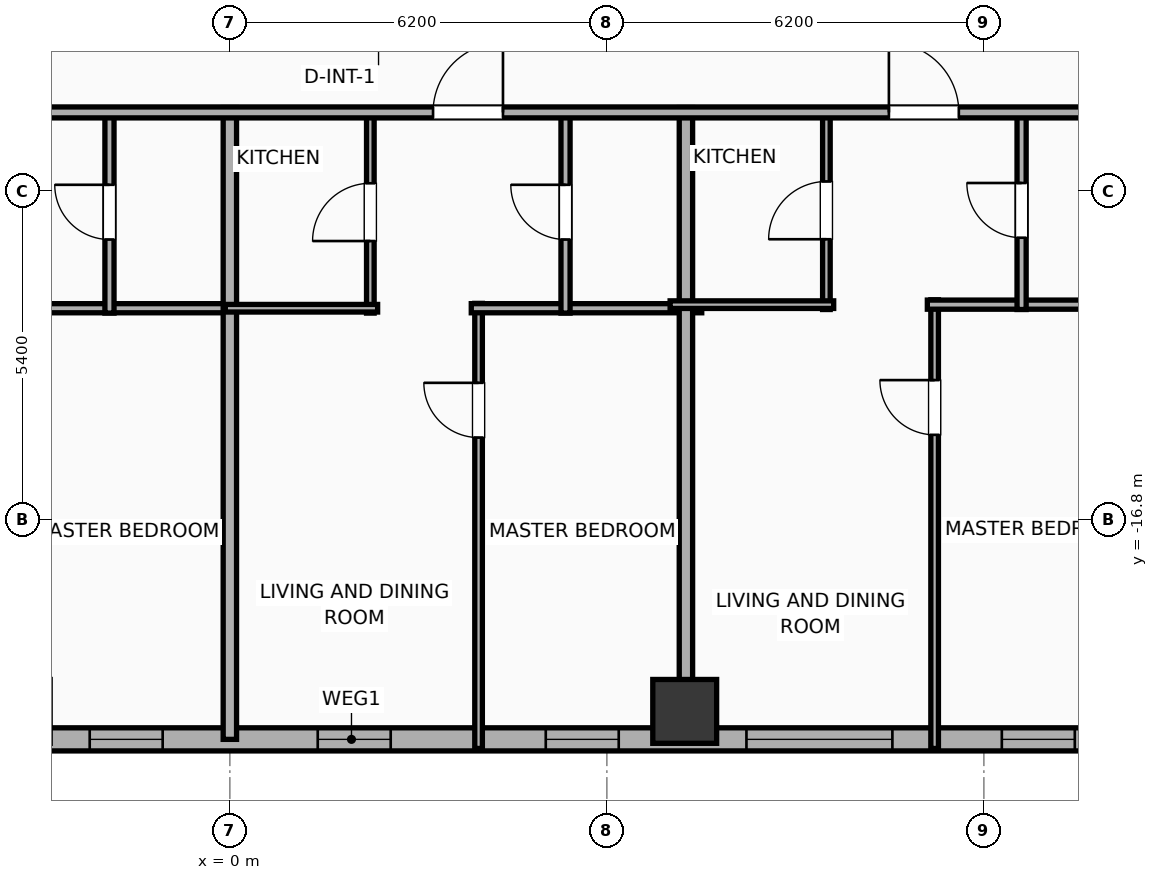
"""IFC4 building model, lengths in metres.
Left out: names, types, materials, properties, quantities, classifications, styles, units other than length and angle.
Written with IfcOpenShell. Run it as: python <this file> out.ifc"""

import sys

from ifc_helpers import new_model, si_unit, direction, frame, frame_2d, origin, origin_2d, place, context, subcontext, project, spatial, rectangle, hollow_rectangle, extrude, element, fill, save


model = new_model("IFC4")
c1 = context("Model", 3, precision=1e-05, world=origin(), true_north=direction((0.0, 1.0)))
c2 = subcontext(c1, "Body", "Model", "MODEL_VIEW")
j1 = project(units=[si_unit("LENGTHUNIT", "METRE"), si_unit("PLANEANGLEUNIT", "RADIAN")], contexts=[c1])
p1 = place(None, origin())
s1 = spatial("IfcSite", under=j1, at=p1, CompositionType="ELEMENT")
p2 = place(p1, origin())
s2 = spatial("IfcBuilding", under=s1, at=p2, CompositionType="ELEMENT")
p3 = place(p2, frame((0.0, 0.0, 136.5)))
s3 = spatial("IfcBuildingStorey", under=s2, at=p3, CompositionType="ELEMENT", Elevation=136.5)
p4 = place(p3, frame((7.48, -19.95, 0.0), z_axis=(0.0, 0.0, 1.0), x_axis=(1.0, 0.0, 0.0)))
e1 = element("IfcColumn", 1, at=p4, inside=s3, PredefinedType="COLUMN", context=c2, shape_type="SweptSolid", body=[
    extrude(hollow_rectangle(XDim=1.05, YDim=1.05, WallThickness=0.036, at=origin_2d()), origin(), (0.0, 0.0, 1.0), 3.865),
])
p5 = place(p3, frame((29.381, -20.41, 0.0), z_axis=(0.0, 0.0, 1.0), x_axis=(-1.0, 0.0, 0.0)))
e2 = element("IfcWall", 2, at=p5, inside=s3, PredefinedType="ELEMENTEDWALL", context=c2, shape_type="SweptSolid", body=[
    extrude(rectangle(XDim=54.763, YDim=0.38, at=frame_2d((27.381, 0.0))), origin(), (0.0, 0.0, 1.0), 2.39),
])
p6 = place(p5, frame((7.295, 0.0, 0.75)))
e3 = element("IfcOpeningElement", 3, at=p6, cuts=e2, PredefinedType="OPENING", context=c2, shape_type="SweptSolid", body=[
    extrude(rectangle(XDim=2.4, YDim=1.45, at=frame_2d((1.2, 0.725))), frame((0.0, 0.2, 0.0), z_axis=(0.0, -1.0, 0.0), x_axis=(1.0, 0.0, 0.0)), (0.0, 0.0, 1.0), 0.4),
])
p7 = place(p5, frame((18.486, 0.0, 0.75)))
e4 = element("IfcOpeningElement", 4, at=p7, cuts=e2, PredefinedType="OPENING", context=c2, shape_type="SweptSolid", body=[
    extrude(rectangle(XDim=2.4, YDim=1.45, at=frame_2d((1.2, 0.725))), frame((0.0, 0.2, 0.0), z_axis=(0.0, -1.0, 0.0), x_axis=(1.0, 0.0, 0.0)), (0.0, 0.0, 1.0), 0.4),
])
p8 = place(p5, frame((33.877, 0.0, 0.75)))
e5 = element("IfcOpeningElement", 5, at=p8, cuts=e2, PredefinedType="OPENING", context=c2, shape_type="SweptSolid", body=[
    extrude(rectangle(XDim=2.4, YDim=1.45, at=frame_2d((1.2, 0.725))), frame((0.0, 0.2, 0.0), z_axis=(0.0, -1.0, 0.0), x_axis=(1.0, 0.0, 0.0)), (0.0, 0.0, 1.0), 0.4),
])
p9 = place(p5, frame((48.367, 0.0, 0.75)))
e6 = element("IfcOpeningElement", 6, at=p9, cuts=e2, PredefinedType="OPENING", context=c2, shape_type="SweptSolid", body=[
    extrude(rectangle(XDim=2.4, YDim=1.45, at=frame_2d((1.2, 0.725))), frame((0.0, 0.2, 0.0), z_axis=(0.0, -1.0, 0.0), x_axis=(1.0, 0.0, 0.0)), (0.0, 0.0, 1.0), 0.4),
])
p10 = place(p5, frame((52.277, 0.0, 0.55)))
e7 = element("IfcOpeningElement", 7, at=p10, cuts=e2, PredefinedType="OPENING", context=c2, shape_type="SweptSolid", body=[
    extrude(rectangle(XDim=1.2, YDim=1.15, at=frame_2d((0.6, 0.575))), frame((0.0, 0.2, 0.0), z_axis=(0.0, -1.0, 0.0), x_axis=(1.0, 0.0, 0.0)), (0.0, 0.0, 1.0), 0.4),
])
p11 = place(p5, frame((45.486, 0.0, 0.55)))
e8 = element("IfcOpeningElement", 8, at=p11, cuts=e2, PredefinedType="OPENING", context=c2, shape_type="SweptSolid", body=[
    extrude(rectangle(XDim=1.2, YDim=1.15, at=frame_2d((0.6, 0.575))), frame((0.0, 0.2, 0.0), z_axis=(0.0, -1.0, 0.0), x_axis=(1.0, 0.0, 0.0)), (0.0, 0.0, 1.0), 0.4),
])
p12 = place(p5, frame((41.736, 0.0, 0.55)))
e9 = element("IfcOpeningElement", 9, at=p12, cuts=e2, PredefinedType="OPENING", context=c2, shape_type="SweptSolid", body=[
    extrude(rectangle(XDim=1.2, YDim=1.15, at=frame_2d((0.6, 0.575))), frame((0.0, 0.2, 0.0), z_axis=(0.0, -1.0, 0.0), x_axis=(1.0, 0.0, 0.0)), (0.0, 0.0, 1.0), 0.4),
])
p13 = place(p5, frame((37.986, 0.0, 0.55)))
e10 = element("IfcOpeningElement", 10, at=p13, cuts=e2, PredefinedType="OPENING", context=c2, shape_type="SweptSolid", body=[
    extrude(rectangle(XDim=1.2, YDim=1.15, at=frame_2d((0.6, 0.575))), frame((0.0, 0.2, 0.0), z_axis=(0.0, -1.0, 0.0), x_axis=(1.0, 0.0, 0.0)), (0.0, 0.0, 1.0), 0.4),
])
p14 = place(p5, frame((30.486, 0.0, 0.55)))
e11 = element("IfcOpeningElement", 11, at=p14, cuts=e2, PredefinedType="OPENING", context=c2, shape_type="SweptSolid", body=[
    extrude(rectangle(XDim=1.2, YDim=1.15, at=frame_2d((0.6, 0.575))), frame((0.0, 0.2, 0.0), z_axis=(0.0, -1.0, 0.0), x_axis=(1.0, 0.0, 0.0)), (0.0, 0.0, 1.0), 0.4),
])
p15 = place(p5, frame((26.736, 0.0, 0.55)))
e12 = element("IfcOpeningElement", 12, at=p15, cuts=e2, PredefinedType="OPENING", context=c2, shape_type="SweptSolid", body=[
    extrude(rectangle(XDim=1.2, YDim=1.15, at=frame_2d((0.6, 0.575))), frame((0.0, 0.2, 0.0), z_axis=(0.0, -1.0, 0.0), x_axis=(1.0, 0.0, 0.0)), (0.0, 0.0, 1.0), 0.4),
])
p16 = place(p5, frame((22.986, 0.0, 0.55)))
e13 = element("IfcOpeningElement", 13, at=p16, cuts=e2, PredefinedType="OPENING", context=c2, shape_type="SweptSolid", body=[
    extrude(rectangle(XDim=1.2, YDim=1.15, at=frame_2d((0.6, 0.575))), frame((0.0, 0.2, 0.0), z_axis=(0.0, -1.0, 0.0), x_axis=(1.0, 0.0, 0.0)), (0.0, 0.0, 1.0), 0.4),
])
p17 = place(p5, frame((15.486, 0.0, 0.55)))
e14 = element("IfcOpeningElement", 14, at=p17, cuts=e2, PredefinedType="OPENING", context=c2, shape_type="SweptSolid", body=[
    extrude(rectangle(XDim=1.2, YDim=1.15, at=frame_2d((0.6, 0.575))), frame((0.0, 0.2, 0.0), z_axis=(0.0, -1.0, 0.0), x_axis=(1.0, 0.0, 0.0)), (0.0, 0.0, 1.0), 0.4),
])
p18 = place(p5, frame((11.736, 0.0, 0.55)))
e15 = element("IfcOpeningElement", 15, at=p18, cuts=e2, PredefinedType="OPENING", context=c2, shape_type="SweptSolid", body=[
    extrude(rectangle(XDim=1.2, YDim=1.15, at=frame_2d((0.6, 0.575))), frame((0.0, 0.2, 0.0), z_axis=(0.0, -1.0, 0.0), x_axis=(1.0, 0.0, 0.0)), (0.0, 0.0, 1.0), 0.4),
])
p19 = place(p5, frame((3.286, 0.0, 0.55)))
e16 = element("IfcOpeningElement", 16, at=p19, cuts=e2, PredefinedType="OPENING", context=c2, shape_type="SweptSolid", body=[
    extrude(rectangle(XDim=1.2, YDim=1.15, at=frame_2d((0.6, 0.575))), frame((0.0, 0.2, 0.0), z_axis=(0.0, -1.0, 0.0), x_axis=(1.0, 0.0, 0.0)), (0.0, 0.0, 1.0), 0.4),
])
p20 = place(p3, frame((-3.53, -13.32, 0.0), z_axis=(0.0, 0.0, 1.0), x_axis=(1.0, 0.0, 0.0)))
e17 = element("IfcWall", 17, at=p20, inside=s3, PredefinedType="PLUMBINGWALL", context=c2, shape_type="SweptSolid", body=[
    extrude(rectangle(XDim=3.605, YDim=0.15, at=frame_2d((1.802, 0.0))), origin(), (0.0, 0.0, 1.0), 3.5),
])
p21 = place(p3, frame((-1.98, -13.4, 0.0), z_axis=(0.0, 0.0, 1.0), x_axis=(0.0, 1.0, 0.0)))
e18 = element("IfcWall", 18, at=p21, inside=s3, PredefinedType="PLUMBINGWALL", context=c2, shape_type="SweptSolid", body=[
    extrude(rectangle(XDim=3.32, YDim=0.15, at=frame_2d((1.66, 0.0))), origin(), (0.0, 0.0, 1.0), 3.5),
])
p22 = place(p21, frame((1.21, 0.0, 0.0)))
e19 = element("IfcOpeningElement", 19, at=p22, cuts=e18, PredefinedType="OPENING", context=c2, shape_type="SweptSolid", body=[
    extrude(rectangle(XDim=0.9, YDim=2.05, at=frame_2d((0.45, 1.025))), frame((0.0, 0.085, 0.0), z_axis=(0.0, -1.0, 0.0), x_axis=(1.0, 0.0, 0.0)), (0.0, 0.0, 1.0), 0.17),
])
p23 = place(p3, frame((0.0, -20.41, 0.0), z_axis=(0.0, 0.0, 1.0), x_axis=(0.0, 1.0, 0.0)))
e20 = element("IfcWall", 20, at=p23, inside=s3, PredefinedType="PARTITIONING", context=c2, shape_type="SweptSolid", body=[
    extrude(rectangle(XDim=10.39, YDim=0.22, at=frame_2d((5.195, 0.0))), origin(), (0.0, 0.0, 1.0), 3.5),
])
p24 = place(p3, frame((4.09, -20.56, 0.0), z_axis=(0.0, 0.0, 1.0), x_axis=(0.0, 1.0, 0.0)))
e21 = element("IfcWall", 21, at=p24, inside=s3, PredefinedType="PARTITIONING", context=c2, shape_type="SweptSolid", body=[
    extrude(rectangle(XDim=7.32, YDim=0.125, at=frame_2d((3.66, 0.0))), origin(), (0.0, 0.0, 1.0), 2.39),
])
p25 = place(p24, frame((5.113, 0.0, 0.0)))
e22 = element("IfcOpeningElement", 22, at=p25, cuts=e21, PredefinedType="OPENING", context=c2, shape_type="SweptSolid", body=[
    extrude(rectangle(XDim=0.9, YDim=2.05, at=frame_2d((0.45, 1.025))), frame((0.0, 0.073, 0.0), z_axis=(0.0, -1.0, 0.0), x_axis=(1.0, 0.0, 0.0)), (0.0, 0.0, 1.0), 0.145),
])
p26 = place(p3, frame((3.97, -13.32, 0.0), z_axis=(0.0, 0.0, 1.0), x_axis=(1.0, 0.0, 0.0)))
e23 = element("IfcWall", 23, at=p26, inside=s3, PredefinedType="PLUMBINGWALL", context=c2, shape_type="SweptSolid", body=[
    extrude(rectangle(XDim=3.79, YDim=0.15, at=frame_2d((1.895, 0.0))), origin(), (0.0, 0.0, 1.0), 3.5),
])
p27 = place(p3, frame((2.31, -13.4, 0.0), z_axis=(0.0, 0.0, 1.0), x_axis=(0.0, 1.0, 0.0)))
e24 = element("IfcWall", 24, at=p27, inside=s3, PredefinedType="PARTITIONING", context=c2, shape_type="SweptSolid", body=[
    extrude(rectangle(XDim=3.32, YDim=0.125, at=frame_2d((1.66, 0.0))), origin(), (0.0, 0.0, 1.0), 3.5),
])
p28 = place(p27, frame((1.185, 0.0, 0.0)))
e25 = element("IfcOpeningElement", 25, at=p28, cuts=e24, PredefinedType="OPENING", context=c2, shape_type="SweptSolid", body=[
    extrude(rectangle(XDim=0.95, YDim=2.05, at=frame_2d((0.475, 1.025))), frame((0.0, 0.073, 0.0), z_axis=(0.0, -1.0, 0.0), x_axis=(1.0, 0.0, 0.0)), (0.0, 0.0, 1.0), 0.145),
])
p29 = place(p3, frame((-0.075, -13.32, 0.0), z_axis=(0.0, 0.0, 1.0), x_axis=(1.0, 0.0, 0.0)))
e26 = element("IfcWall", 26, at=p29, inside=s3, PredefinedType="PARTITIONING", context=c2, shape_type="SweptSolid", body=[
    extrude(rectangle(XDim=2.505, YDim=0.125, at=frame_2d((1.252, 0.0))), origin(), (0.0, 0.0, 1.0), 3.5),
])
p30 = place(p3, frame((5.52, -13.4, 0.0), z_axis=(0.0, 0.0, 1.0), x_axis=(0.0, 1.0, 0.0)))
e27 = element("IfcWall", 27, at=p30, inside=s3, PredefinedType="PLUMBINGWALL", context=c2, shape_type="SweptSolid", body=[
    extrude(rectangle(XDim=3.32, YDim=0.15, at=frame_2d((1.66, 0.0))), origin(), (0.0, 0.0, 1.0), 2.39),
])
p31 = place(p30, frame((1.21, 0.0, 0.0)))
e28 = element("IfcOpeningElement", 28, at=p31, cuts=e27, PredefinedType="OPENING", context=c2, shape_type="SweptSolid", body=[
    extrude(rectangle(XDim=0.9, YDim=2.05, at=frame_2d((0.45, 1.025))), frame((0.0, 0.085, 0.0), z_axis=(0.0, -1.0, 0.0), x_axis=(1.0, 0.0, 0.0)), (0.0, 0.0, 1.0), 0.17),
])
p32 = place(p3, frame((7.5, -20.41, 0.0), z_axis=(0.0, 0.0, 1.0), x_axis=(0.0, 1.0, 0.0)))
e29 = element("IfcWall", 29, at=p32, inside=s3, PredefinedType="PARTITIONING", context=c2, shape_type="SweptSolid", body=[
    extrude(rectangle(XDim=10.39, YDim=0.22, at=frame_2d((5.195, 0.0))), origin(), (0.0, 0.0, 1.0), 2.39),
])
p33 = place(p3, frame((11.59, -20.56, 0.0), z_axis=(0.0, 0.0, 1.0), x_axis=(0.0, 1.0, 0.0)))
e30 = element("IfcWall", 30, at=p33, inside=s3, PredefinedType="PARTITIONING", context=c2, shape_type="SweptSolid", body=[
    extrude(rectangle(XDim=7.379, YDim=0.125, at=frame_2d((3.689, 0.0))), origin(), (0.0, 0.0, 1.0), 3.5),
])
p34 = place(p33, frame((5.158, 0.0, 0.0)))
e31 = element("IfcOpeningElement", 31, at=p34, cuts=e30, PredefinedType="OPENING", context=c2, shape_type="SweptSolid", body=[
    extrude(rectangle(XDim=0.9, YDim=2.05, at=frame_2d((0.45, 1.025))), frame((0.0, 0.073, 0.0), z_axis=(0.0, -1.0, 0.0), x_axis=(1.0, 0.0, 0.0)), (0.0, 0.0, 1.0), 0.145),
])
p35 = place(p3, frame((11.47, -13.261, 0.0), z_axis=(0.0, 0.0, 1.0), x_axis=(1.0, 0.0, 0.0)))
e32 = element("IfcWall", 32, at=p35, inside=s3, PredefinedType="PLUMBINGWALL", context=c2, shape_type="SweptSolid", body=[
    extrude(rectangle(XDim=3.79, YDim=0.15, at=frame_2d((1.895, 0.0))), origin(), (0.0, 0.0, 1.0), 3.5),
])
p36 = place(p3, frame((9.81, -13.341, 0.0), z_axis=(0.0, 0.0, 1.0), x_axis=(0.0, 1.0, 0.0)))
e33 = element("IfcWall", 33, at=p36, inside=s3, PredefinedType="PARTITIONING", context=c2, shape_type="SweptSolid", body=[
    extrude(rectangle(XDim=3.261, YDim=0.125, at=frame_2d((1.63, 0.0))), origin(), (0.0, 0.0, 1.0), 3.5),
])
p37 = place(p36, frame((1.156, 0.0, 0.0)))
e34 = element("IfcOpeningElement", 34, at=p37, cuts=e33, PredefinedType="OPENING", context=c2, shape_type="SweptSolid", body=[
    extrude(rectangle(XDim=0.95, YDim=2.05, at=frame_2d((0.475, 1.025))), frame((0.0, 0.073, 0.0), z_axis=(0.0, -1.0, 0.0), x_axis=(1.0, 0.0, 0.0)), (0.0, 0.0, 1.0), 0.145),
])
p38 = place(p3, frame((7.24, -13.261, 0.0), z_axis=(0.0, 0.0, 1.0), x_axis=(1.0, 0.0, 0.0)))
e35 = element("IfcWall", 35, at=p38, inside=s3, PredefinedType="PARTITIONING", context=c2, shape_type="SweptSolid", body=[
    extrude(rectangle(XDim=2.69, YDim=0.125, at=frame_2d((1.345, 0.0))), origin(), (0.0, 0.0, 1.0), 3.5),
])
p39 = place(p3, frame((13.02, -13.341, 0.0), z_axis=(0.0, 0.0, 1.0), x_axis=(0.0, 1.0, 0.0)))
e36 = element("IfcWall", 36, at=p39, inside=s3, PredefinedType="PLUMBINGWALL", context=c2, shape_type="SweptSolid", body=[
    extrude(rectangle(XDim=3.261, YDim=0.15, at=frame_2d((1.63, 0.0))), origin(), (0.0, 0.0, 1.0), 3.5),
])
p40 = place(p39, frame((1.18, 0.0, 0.0)))
e37 = element("IfcOpeningElement", 37, at=p40, cuts=e36, PredefinedType="OPENING", context=c2, shape_type="SweptSolid", body=[
    extrude(rectangle(XDim=0.9, YDim=2.05, at=frame_2d((0.45, 1.025))), frame((0.0, 0.085, 0.0), z_axis=(0.0, -1.0, 0.0), x_axis=(1.0, 0.0, 0.0)), (0.0, 0.0, 1.0), 0.17),
])
p41 = place(p3, frame((-29.21, -10.1, 0.0), z_axis=(0.0, 0.0, 1.0), x_axis=(1.0, 0.0, 0.0)))
e38 = element("IfcWall", 38, at=p41, inside=s3, PredefinedType="PARTITIONING", context=c2, shape_type="SweptSolid", body=[
    extrude(rectangle(XDim=62.42, YDim=0.18, at=frame_2d((31.21, 0.0))), origin(), (0.0, 0.0, 1.0), 2.39),
])
p42 = place(p41, frame((3.002, 0.0, 0.0)))
e39 = element("IfcOpeningElement", 39, at=p42, cuts=e38, PredefinedType="OPENING", context=c2, shape_type="SweptSolid", body=[
    extrude(rectangle(XDim=0.9, YDim=2.05, at=frame_2d((0.45, 1.025))), frame((0.0, 0.1, 0.0), z_axis=(0.0, -1.0, 0.0), x_axis=(1.0, 0.0, 0.0)), (0.0, 0.0, 1.0), 0.2),
])
p43 = place(p41, frame((10.049, 0.0, 0.0)))
e40 = element("IfcOpeningElement", 40, at=p43, cuts=e38, PredefinedType="OPENING", context=c2, shape_type="SweptSolid", body=[
    extrude(rectangle(XDim=1.15, YDim=2.05, at=frame_2d((0.575, 1.025))), frame((0.0, 0.1, 0.0), z_axis=(0.0, -1.0, 0.0), x_axis=(1.0, 0.0, 0.0)), (0.0, 0.0, 1.0), 0.2),
])
p44 = place(p41, frame((17.552, 0.0, 0.0)))
e41 = element("IfcOpeningElement", 41, at=p44, cuts=e38, PredefinedType="OPENING", context=c2, shape_type="SweptSolid", body=[
    extrude(rectangle(XDim=1.15, YDim=2.05, at=frame_2d((0.575, 1.025))), frame((0.0, 0.1, 0.0), z_axis=(0.0, -1.0, 0.0), x_axis=(1.0, 0.0, 0.0)), (0.0, 0.0, 1.0), 0.2),
])
p45 = place(p41, frame((25.048, 0.0, 0.0)))
e42 = element("IfcOpeningElement", 42, at=p45, cuts=e38, PredefinedType="OPENING", context=c2, shape_type="SweptSolid", body=[
    extrude(rectangle(XDim=1.15, YDim=2.05, at=frame_2d((0.575, 1.025))), frame((0.0, 0.1, 0.0), z_axis=(0.0, -1.0, 0.0), x_axis=(1.0, 0.0, 0.0)), (0.0, 0.0, 1.0), 0.2),
])
p46 = place(p41, frame((32.551, 0.0, 0.0)))
e43 = element("IfcOpeningElement", 43, at=p46, cuts=e38, PredefinedType="OPENING", context=c2, shape_type="SweptSolid", body=[
    extrude(rectangle(XDim=1.15, YDim=2.05, at=frame_2d((0.575, 1.025))), frame((0.0, 0.1, 0.0), z_axis=(0.0, -1.0, 0.0), x_axis=(1.0, 0.0, 0.0)), (0.0, 0.0, 1.0), 0.2),
])
p47 = place(p41, frame((40.048, 0.0, 0.0)))
e44 = element("IfcOpeningElement", 44, at=p47, cuts=e38, PredefinedType="OPENING", context=c2, shape_type="SweptSolid", body=[
    extrude(rectangle(XDim=1.15, YDim=2.05, at=frame_2d((0.575, 1.025))), frame((0.0, 0.1, 0.0), z_axis=(0.0, -1.0, 0.0), x_axis=(1.0, 0.0, 0.0)), (0.0, 0.0, 1.0), 0.2),
])
p48 = place(p41, frame((47.551, 0.0, 0.0)))
e45 = element("IfcOpeningElement", 45, at=p48, cuts=e38, PredefinedType="OPENING", context=c2, shape_type="SweptSolid", body=[
    extrude(rectangle(XDim=1.15, YDim=2.05, at=frame_2d((0.575, 1.025))), frame((0.0, 0.1, 0.0), z_axis=(0.0, -1.0, 0.0), x_axis=(1.0, 0.0, 0.0)), (0.0, 0.0, 1.0), 0.2),
])
p49 = place(p41, frame((57.064, 0.0, 0.0)))
e46 = element("IfcOpeningElement", 46, at=p49, cuts=e38, PredefinedType="OPENING", context=c2, shape_type="SweptSolid", body=[
    extrude(rectangle(XDim=1.15, YDim=2.05, at=frame_2d((0.575, 1.025))), frame((0.0, 0.1, 0.0), z_axis=(0.0, -1.0, 0.0), x_axis=(1.0, 0.0, 0.0)), (0.0, 0.0, 1.0), 0.2),
])
p50 = place(p7, origin())
e47 = element("IfcWindow", 47, at=p50, inside=s3, PartitioningType="SINGLE_PANEL", PredefinedType="WINDOW", context=c2, shape_type="SweptSolid", body=[
    extrude(rectangle(XDim=2.4, YDim=1.45, at=frame_2d((1.2, 0.725))), frame((0.0, 0.03, 0.0), z_axis=(0.0, -1.0, 0.0), x_axis=(1.0, 0.0, 0.0)), (0.0, 0.0, 1.0), 0.06),
])
fill(e4, e47)
p51 = place(p14, origin())
e48 = element("IfcWindow", 48, at=p51, inside=s3, PartitioningType="SINGLE_PANEL", PredefinedType="WINDOW", context=c2, shape_type="SweptSolid", body=[
    extrude(rectangle(XDim=1.2, YDim=1.15, at=frame_2d((0.6, 0.575))), frame((0.0, 0.03, 0.0), z_axis=(0.0, -1.0, 0.0), x_axis=(1.0, 0.0, 0.0)), (0.0, 0.0, 1.0), 0.06),
])
fill(e11, e48)
p52 = place(p15, origin())
e49 = element("IfcWindow", 49, at=p52, inside=s3, PartitioningType="SINGLE_PANEL", PredefinedType="WINDOW", context=c2, shape_type="SweptSolid", body=[
    extrude(rectangle(XDim=1.2, YDim=1.15, at=frame_2d((0.6, 0.575))), frame((0.0, 0.03, 0.0), z_axis=(0.0, -1.0, 0.0), x_axis=(1.0, 0.0, 0.0)), (0.0, 0.0, 1.0), 0.06),
])
fill(e12, e49)
p53 = place(p16, origin())
e50 = element("IfcWindow", 50, at=p53, inside=s3, PartitioningType="SINGLE_PANEL", PredefinedType="WINDOW", context=c2, shape_type="SweptSolid", body=[
    extrude(rectangle(XDim=1.2, YDim=1.15, at=frame_2d((0.6, 0.575))), frame((0.0, 0.03, 0.0), z_axis=(0.0, -1.0, 0.0), x_axis=(1.0, 0.0, 0.0)), (0.0, 0.0, 1.0), 0.06),
])
fill(e13, e50)
p54 = place(p17, origin())
e51 = element("IfcWindow", 51, at=p54, inside=s3, PartitioningType="SINGLE_PANEL", PredefinedType="WINDOW", context=c2, shape_type="SweptSolid", body=[
    extrude(rectangle(XDim=1.2, YDim=1.15, at=frame_2d((0.6, 0.575))), frame((0.0, 0.03, 0.0), z_axis=(0.0, -1.0, 0.0), x_axis=(1.0, 0.0, 0.0)), (0.0, 0.0, 1.0), 0.06),
])
fill(e14, e51)
p55 = place(p22, origin())
e52 = element("IfcDoor", 52, at=p55, inside=s3, OperationType="SINGLE_SWING_RIGHT", PredefinedType="DOOR", context=c2, shape_type="SweptSolid", body=[
    extrude(rectangle(XDim=0.9, YDim=2.05, at=frame_2d((0.45, 1.025))), frame((0.0, 0.025, 0.0), z_axis=(0.0, -1.0, 0.0), x_axis=(1.0, 0.0, 0.0)), (0.0, 0.0, 1.0), 0.05),
])
fill(e19, e52)
p56 = place(p25, origin())
e53 = element("IfcDoor", 53, at=p56, inside=s3, OperationType="SINGLE_SWING_RIGHT", PredefinedType="DOOR", context=c2, shape_type="SweptSolid", body=[
    extrude(rectangle(XDim=0.9, YDim=2.05, at=frame_2d((0.45, 1.025))), frame((0.0, 0.025, 0.0), z_axis=(0.0, -1.0, 0.0), x_axis=(1.0, 0.0, 0.0)), (0.0, 0.0, 1.0), 0.05),
])
fill(e22, e53)
p57 = place(p28, origin())
e54 = element("IfcDoor", 54, at=p57, inside=s3, OperationType="SINGLE_SWING_LEFT", PredefinedType="DOOR", context=c2, shape_type="SweptSolid", body=[
    extrude(rectangle(XDim=0.95, YDim=2.05, at=frame_2d((0.475, 1.025))), frame((0.0, 0.025, 0.0), z_axis=(0.0, -1.0, 0.0), x_axis=(1.0, 0.0, 0.0)), (0.0, 0.0, 1.0), 0.05),
])
fill(e25, e54)
p58 = place(p31, origin())
e55 = element("IfcDoor", 55, at=p58, inside=s3, OperationType="SINGLE_SWING_RIGHT", PredefinedType="DOOR", context=c2, shape_type="SweptSolid", body=[
    extrude(rectangle(XDim=0.9, YDim=2.05, at=frame_2d((0.45, 1.025))), frame((0.0, 0.025, 0.0), z_axis=(0.0, -1.0, 0.0), x_axis=(1.0, 0.0, 0.0)), (0.0, 0.0, 1.0), 0.05),
])
fill(e28, e55)
p59 = place(p34, origin())
e56 = element("IfcDoor", 56, at=p59, inside=s3, OperationType="SINGLE_SWING_RIGHT", PredefinedType="DOOR", context=c2, shape_type="SweptSolid", body=[
    extrude(rectangle(XDim=0.9, YDim=2.05, at=frame_2d((0.45, 1.025))), frame((0.0, 0.025, 0.0), z_axis=(0.0, -1.0, 0.0), x_axis=(1.0, 0.0, 0.0)), (0.0, 0.0, 1.0), 0.05),
])
fill(e31, e56)
p60 = place(p37, origin())
e57 = element("IfcDoor", 57, at=p60, inside=s3, OperationType="SINGLE_SWING_LEFT", PredefinedType="DOOR", context=c2, shape_type="SweptSolid", body=[
    extrude(rectangle(XDim=0.95, YDim=2.05, at=frame_2d((0.475, 1.025))), frame((0.0, 0.025, 0.0), z_axis=(0.0, -1.0, 0.0), x_axis=(1.0, 0.0, 0.0)), (0.0, 0.0, 1.0), 0.05),
])
fill(e34, e57)
p61 = place(p40, origin())
e58 = element("IfcDoor", 58, at=p61, inside=s3, OperationType="SINGLE_SWING_RIGHT", PredefinedType="DOOR", context=c2, shape_type="SweptSolid", body=[
    extrude(rectangle(XDim=0.9, YDim=2.05, at=frame_2d((0.45, 1.025))), frame((0.0, 0.025, 0.0), z_axis=(0.0, -1.0, 0.0), x_axis=(1.0, 0.0, 0.0)), (0.0, 0.0, 1.0), 0.05),
])
fill(e37, e58)
p62 = place(p46, origin())
e59 = element("IfcDoor", 59, at=p62, inside=s3, OperationType="SINGLE_SWING_RIGHT", PredefinedType="DOOR", context=c2, shape_type="SweptSolid", body=[
    extrude(rectangle(XDim=1.15, YDim=2.05, at=frame_2d((0.575, 1.025))), frame((0.0, 0.025, 0.0), z_axis=(0.0, -1.0, 0.0), x_axis=(1.0, 0.0, 0.0)), (0.0, 0.0, 1.0), 0.05),
])
fill(e43, e59)
p63 = place(p47, origin())
e60 = element("IfcDoor", 60, at=p63, inside=s3, OperationType="SINGLE_SWING_LEFT", PredefinedType="DOOR", context=c2, shape_type="SweptSolid", body=[
    extrude(rectangle(XDim=1.15, YDim=2.05, at=frame_2d((0.575, 1.025))), frame((0.0, 0.025, 0.0), z_axis=(0.0, -1.0, 0.0), x_axis=(1.0, 0.0, 0.0)), (0.0, 0.0, 1.0), 0.05),
])
fill(e44, e60)
save(model, sys.argv[1])
